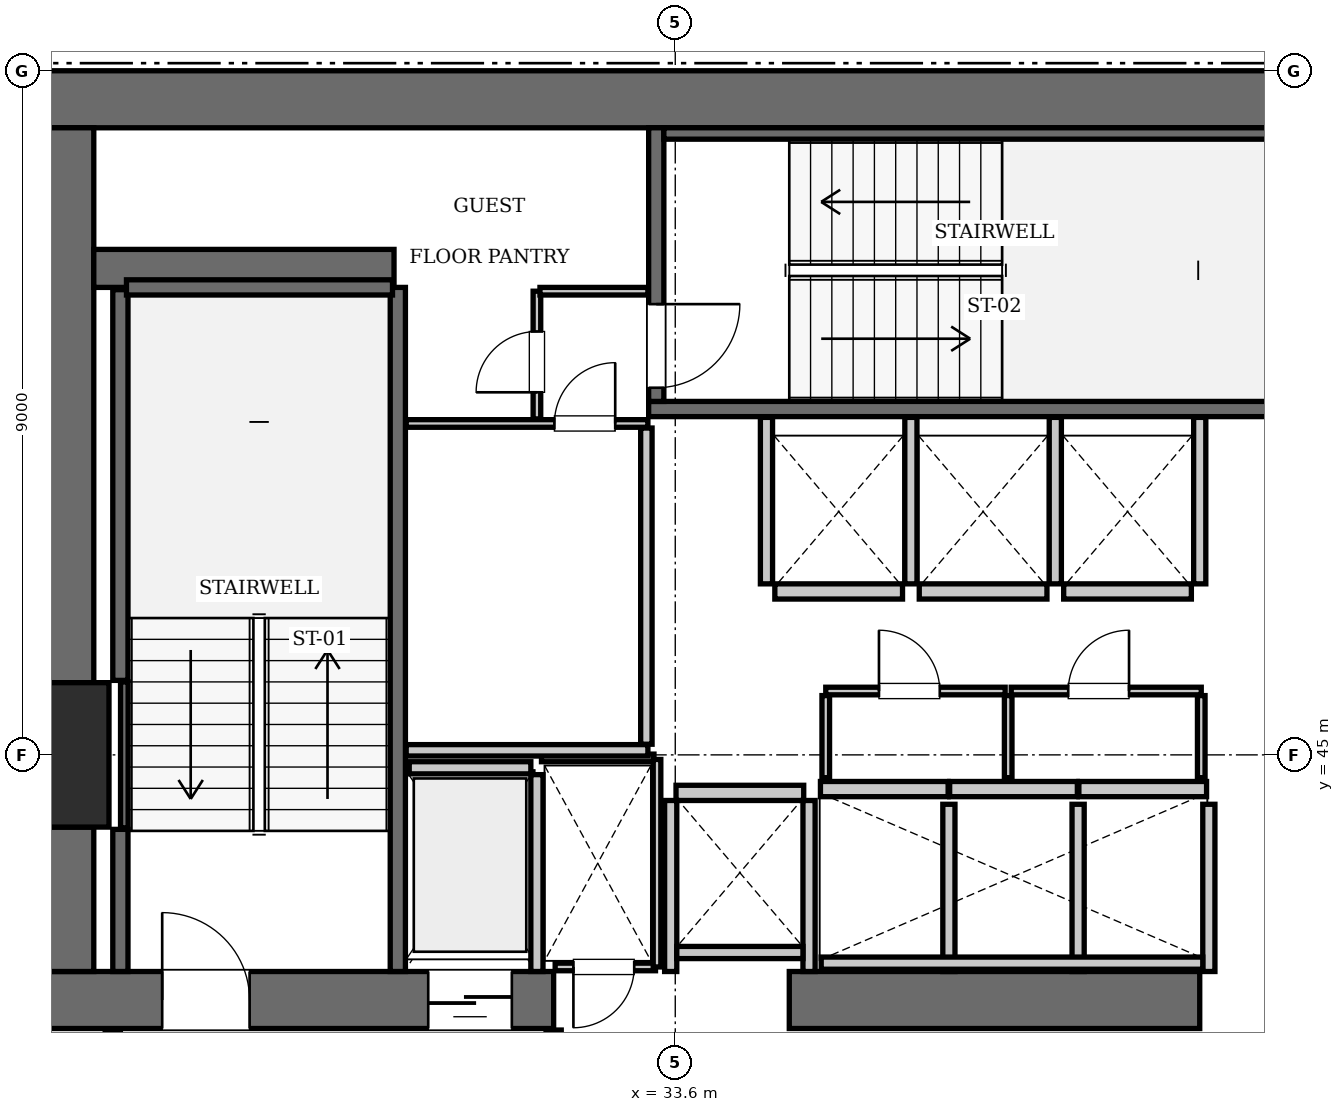
"""IFC4 building model, lengths in metres.
Left out: names, types, materials, properties, quantities, classifications, styles, units other than length and angle.
Written with IfcOpenShell. Run it as: python <this file> out.ifc"""

import sys

from ifc_helpers import new_model, si_unit, direction, frame, frame_2d, origin, origin_2d, place, context, subcontext, project, spatial, rectangle, extrude, element, fill, save


model = new_model("IFC4")
c1 = context("Model", 3, precision=1e-05, world=origin(), true_north=direction((0.0, 1.0)))
c2 = subcontext(c1, "Body", "Model", "MODEL_VIEW")
j1 = project(units=[si_unit("LENGTHUNIT", "METRE"), si_unit("PLANEANGLEUNIT", "RADIAN")], contexts=[c1])
p1 = place(None, origin())
s1 = spatial("IfcSite", under=j1, at=p1, CompositionType="ELEMENT")
p2 = place(p1, origin())
s2 = spatial("IfcBuilding", under=s1, at=p2, CompositionType="ELEMENT")
p3 = place(p2, frame((0.0, 0.0, 146.65)))
s3 = spatial("IfcBuildingStorey", under=s2, at=p3, CompositionType="ELEMENT", Elevation=146.65)
p4 = place(p3, frame((25.2, 45.0, 0.0), z_axis=(0.0, 0.0, 1.0), x_axis=(1.0, 0.0, 0.0)))
e1 = element("IfcColumn", 1, at=p4, inside=s3, PredefinedType="COLUMN", context=c2, shape_type="SweptSolid", body=[
    extrude(rectangle(XDim=1.9, YDim=1.9, at=origin_2d()), origin(), (0.0, 0.0, 1.0), 3.85),
])
p5 = place(p3, frame((25.2, 53.625, 0.0), z_axis=(0.0, 0.0, 1.0), x_axis=(1.0, 0.0, 0.0)))
e2 = element("IfcWall", 2, at=p5, inside=s3, PredefinedType="SHEAR", context=c2, shape_type="SweptSolid", body=[
    extrude(rectangle(XDim=25.2, YDim=0.75, at=frame_2d((12.6, 0.0))), origin(), (0.0, 0.0, 1.0), 3.85),
])
p6 = place(p3, frame((25.2, 41.775, 0.0), z_axis=(0.0, 0.0, 1.0), x_axis=(1.0, 0.0, 0.0)))
e3 = element("IfcWall", 3, at=p6, inside=s3, PredefinedType="SHEAR", context=c2, shape_type="SweptSolid", body=[
    extrude(rectangle(XDim=6.8, YDim=0.75, at=frame_2d((3.4, 0.0))), origin(), (0.0, 0.0, 1.0), 3.85),
])
p7 = place(p6, frame((1.65, 0.0, 0.0)))
e4 = element("IfcOpeningElement", 4, at=p7, cuts=e3, PredefinedType="OPENING", context=c2, shape_type="SweptSolid", body=[
    extrude(rectangle(XDim=1.15, YDim=2.15, at=frame_2d((0.575, 1.075))), frame((0.0, 0.385, 0.0), z_axis=(0.0, -1.0, 0.0), x_axis=(1.0, 0.0, 0.0)), (0.0, 0.0, 1.0), 0.77),
])
p8 = place(p6, frame((5.15, 0.0, 0.0)))
e5 = element("IfcOpeningElement", 5, at=p8, cuts=e3, PredefinedType="OPENING", context=c2, shape_type="SweptSolid", body=[
    extrude(rectangle(XDim=1.1, YDim=2.2, at=frame_2d((0.55, 1.1))), frame((0.0, 0.385, 0.0), z_axis=(0.0, -1.0, 0.0), x_axis=(1.0, 0.0, 0.0)), (0.0, 0.0, 1.0), 0.77),
])
p9 = place(p3, frame((35.1, 41.775, 0.0), z_axis=(0.0, 0.0, 1.0), x_axis=(1.0, 0.0, 0.0)))
e6 = element("IfcWall", 6, at=p9, inside=s3, PredefinedType="SHEAR", context=c2, shape_type="SweptSolid", body=[
    extrude(rectangle(XDim=5.4, YDim=0.75, at=frame_2d((2.7, 0.0))), origin(), (0.0, 0.0, 1.0), 3.85),
])
p10 = place(p3, frame((25.575, 42.15, 0.0), z_axis=(0.0, 0.0, 1.0), x_axis=(0.0, 1.0, 0.0)))
e7 = element("IfcWall", 7, at=p10, inside=s3, PredefinedType="SHEAR", context=c2, shape_type="SweptSolid", body=[
    extrude(rectangle(XDim=1.9, YDim=0.75, at=frame_2d((0.95, 0.0))), origin(), (0.0, 0.0, 1.0), 3.85),
])
p11 = place(p3, frame((25.575, 45.95, 0.0), z_axis=(0.0, 0.0, 1.0), x_axis=(0.0, 1.0, 0.0)))
e8 = element("IfcWall", 8, at=p11, inside=s3, PredefinedType="SHEAR", context=c2, shape_type="SweptSolid", body=[
    extrude(rectangle(XDim=7.3, YDim=0.75, at=frame_2d((3.65, 0.0))), origin(), (0.0, 0.0, 1.0), 3.85),
])
p12 = place(p3, frame((25.95, 51.4, 0.0), z_axis=(0.0, 0.0, 1.0), x_axis=(1.0, 0.0, 0.0)))
e9 = element("IfcWall", 9, at=p12, inside=s3, PredefinedType="SHEAR", context=c2, shape_type="SweptSolid", body=[
    extrude(rectangle(XDim=3.95, YDim=0.5, at=frame_2d((1.975, 0.0))), origin(), (0.0, 0.0, 1.0), 3.85),
])
p13 = place(p3, frame((29.95, 42.15, 0.0), z_axis=(0.0, 0.0, 1.0), x_axis=(0.0, 1.0, 0.0)))
e10 = element("IfcWall", 10, at=p13, inside=s3, PredefinedType="SOLIDWALL", context=c2, shape_type="SweptSolid", body=[
    extrude(rectangle(XDim=9.0, YDim=0.2, at=frame_2d((4.5, 0.0))), origin(), (0.0, 0.0, 1.0), 3.61),
])
p14 = place(p3, frame((26.3, 42.15, 0.0), z_axis=(0.0, 0.0, 1.0), x_axis=(0.0, 1.0, 0.0)))
e11 = element("IfcWall", 11, at=p14, inside=s3, PredefinedType="SOLIDWALL", context=c2, shape_type="SweptSolid", body=[
    extrude(rectangle(XDim=1.87, YDim=0.2, at=frame_2d((0.935, 0.0))), origin(), (0.0, 0.0, 1.0), 3.61),
])
p15 = place(p3, frame((26.3, 45.98, 0.0), z_axis=(0.0, 0.0, 1.0), x_axis=(0.0, 1.0, 0.0)))
e12 = element("IfcWall", 12, at=p15, inside=s3, PredefinedType="SOLIDWALL", context=c2, shape_type="SweptSolid", body=[
    extrude(rectangle(XDim=5.14, YDim=0.2, at=frame_2d((2.57, 0.0))), origin(), (0.0, 0.0, 1.0), 3.61),
])
p16 = place(p3, frame((26.38, 51.15, 0.0), z_axis=(0.0, 0.0, 1.0), x_axis=(1.0, 0.0, 0.0)))
e13 = element("IfcWall", 13, at=p16, inside=s3, PredefinedType="SOLIDWALL", context=c2, shape_type="SweptSolid", body=[
    extrude(rectangle(XDim=3.5, YDim=0.2, at=frame_2d((1.75, 0.0))), origin(), (0.0, 0.0, 1.0), 3.61),
])
p17 = place(p3, frame((26.352, 44.04, 0.0), z_axis=(0.0, 0.0, 1.0), x_axis=(0.0, 1.0, 0.0)))
e14 = element("IfcWall", 14, at=p17, inside=s3, PredefinedType="SOLIDWALL", context=c2, shape_type="SweptSolid", body=[
    extrude(rectangle(XDim=1.92, YDim=0.1, at=frame_2d((0.96, 0.0))), origin(), (0.0, 0.0, 1.0), 3.61),
])
p18 = place(p3, frame((33.25, 49.55, 0.0), z_axis=(0.0, 0.0, 1.0), x_axis=(1.0, 0.0, 0.0)))
e15 = element("IfcWall", 15, at=p18, inside=s3, PredefinedType="SOLIDWALL", context=c2, shape_type="SweptSolid", body=[
    extrude(rectangle(XDim=9.1, YDim=0.2, at=frame_2d((4.55, 0.0))), origin(), (0.0, 0.0, 1.0), 3.61),
])
p19 = place(p3, frame((33.35, 49.65, 0.0), z_axis=(0.0, 0.0, 1.0), x_axis=(0.0, 1.0, 0.0)))
e16 = element("IfcWall", 16, at=p19, inside=s3, PredefinedType="SOLIDWALL", context=c2, shape_type="SweptSolid", body=[
    extrude(rectangle(XDim=3.6, YDim=0.2, at=frame_2d((1.8, 0.0))), origin(), (0.0, 0.0, 1.0), 3.61),
])
p20 = place(p19, frame((0.18, 0.0, 0.0)))
e17 = element("IfcOpeningElement", 17, at=p20, cuts=e16, PredefinedType="OPENING", context=c2, shape_type="SweptSolid", body=[
    extrude(rectangle(XDim=1.1, YDim=2.15, at=frame_2d((0.55, 1.075))), frame((0.0, 0.11, 0.0), z_axis=(0.0, -1.0, 0.0), x_axis=(1.0, 0.0, 0.0)), (0.0, 0.0, 1.0), 0.22),
])
p21 = place(p3, frame((33.45, 53.175, 0.0), z_axis=(0.0, 0.0, 1.0), x_axis=(1.0, 0.0, 0.0)))
e18 = element("IfcWall", 18, at=p21, inside=s3, PredefinedType="SOLIDWALL", context=c2, shape_type="SweptSolid", body=[
    extrude(rectangle(XDim=8.7, YDim=0.15, at=frame_2d((4.35, 0.0))), origin(), (0.0, 0.0, 1.0), 3.61),
])
for number, where, z_axis, x_axis in (
    (19, (35.51, 44.55, 0.0), (0.0, 0.0, 1.0), (1.0, 0.0, 0.0)),
    (20, (37.21, 44.55, 0.0), (0.0, 0.0, 1.0), (1.0, 0.0, 0.0)),
):
    element("IfcWall", number, at=place(p3, frame(where, z_axis=z_axis, x_axis=x_axis)), inside=s3, PredefinedType="SOLIDWALL", context=c2, shape_type="SweptSolid", body=[
        extrude(rectangle(XDim=1.68, YDim=0.2, at=frame_2d((0.84, 0.0))), origin(), (0.0, 0.0, 1.0), 3.61),
    ])
for number, where, z_axis, x_axis in (
    (21, (38.91, 44.55, 0.0), (0.0, 0.0, 1.0), (1.0, 0.0, 0.0)),
    (22, (34.91, 47.15, 0.0), (0.0, 0.0, 1.0), (1.0, 0.0, 0.0)),
):
    element("IfcWall", number, at=place(p3, frame(where, z_axis=z_axis, x_axis=x_axis)), inside=s3, PredefinedType="SOLIDWALL", context=c2, shape_type="SweptSolid", body=[
        extrude(rectangle(XDim=1.68, YDim=0.2, at=frame_2d((0.84, 0.0))), origin(), (0.0, 0.0, 1.0), 3.61),
    ])
for number, where, z_axis, x_axis in (
    (23, (36.81, 47.15, 0.0), (0.0, 0.0, 1.0), (1.0, 0.0, 0.0)),
    (24, (38.71, 47.15, 0.0), (0.0, 0.0, 1.0), (1.0, 0.0, 0.0)),
    (25, (33.61, 44.5, 0.0), (0.0, 0.0, 1.0), (1.0, 0.0, 0.0)),
):
    element("IfcWall", number, at=place(p3, frame(where, z_axis=z_axis, x_axis=x_axis)), inside=s3, PredefinedType="SOLIDWALL", context=c2, shape_type="SweptSolid", body=[
        extrude(rectangle(XDim=1.68, YDim=0.2, at=frame_2d((0.84, 0.0))), origin(), (0.0, 0.0, 1.0), 3.61),
    ])
p22 = place(p3, frame((30.1, 44.83, 0.0), z_axis=(0.0, 0.0, 1.0), x_axis=(1.0, 0.0, 0.0)))
e26 = element("IfcWall", 26, at=p22, inside=s3, PredefinedType="SOLIDWALL", context=c2, shape_type="SweptSolid", body=[
    extrude(rectangle(XDim=1.6, YDim=0.16, at=frame_2d((0.8, 0.0))), origin(), (0.0, 0.0, 1.0), 3.61),
])
p23 = place(p3, frame((31.78, 42.15, 0.0), z_axis=(0.0, 0.0, 1.0), x_axis=(0.0, 1.0, 0.0)))
e27 = element("IfcWall", 27, at=p23, inside=s3, PredefinedType="SOLIDWALL", context=c2, shape_type="SweptSolid", body=[
    extrude(rectangle(XDim=2.59, YDim=0.16, at=frame_2d((1.295, 0.0))), origin(), (0.0, 0.0, 1.0), 3.61),
])
for number, where, z_axis, x_axis in (
    (28, (37.2, 42.15, 0.0), (0.0, 0.0, 1.0), (0.0, 1.0, 0.0)),
    (29, (38.9, 42.15, 0.0), (0.0, 0.0, 1.0), (0.0, 1.0, 0.0)),
    (30, (40.62, 42.15, 0.0), (0.0, 0.0, 1.0), (0.0, 1.0, 0.0)),
):
    element("IfcWall", number, at=place(p3, frame(where, z_axis=z_axis, x_axis=x_axis)), inside=s3, PredefinedType="SOLIDWALL", context=c2, shape_type="SweptSolid", body=[
        extrude(rectangle(XDim=2.2, YDim=0.16, at=frame_2d((1.1, 0.0))), origin(), (0.0, 0.0, 1.0), 3.61),
    ])
p24 = place(p3, frame((35.52, 42.26, 0.0), z_axis=(0.0, 0.0, 1.0), x_axis=(1.0, 0.0, 0.0)))
e31 = element("IfcWall", 31, at=p24, inside=s3, PredefinedType="SOLIDWALL", context=c2, shape_type="SweptSolid", body=[
    extrude(rectangle(XDim=5.02, YDim=0.16, at=frame_2d((2.51, 0.0))), origin(), (0.0, 0.0, 1.0), 3.61),
])
for number, where, z_axis, x_axis in (
    (32, (34.8, 47.25, 0.0), (0.0, 0.0, 1.0), (0.0, 1.0, 0.0)),
    (33, (36.7, 47.25, 0.0), (0.0, 0.0, 1.0), (0.0, 1.0, 0.0)),
    (34, (38.6, 47.25, 0.0), (0.0, 0.0, 1.0), (0.0, 1.0, 0.0)),
    (35, (40.5, 47.25, 0.0), (0.0, 0.0, 1.0), (0.0, 1.0, 0.0)),
):
    element("IfcWall", number, at=place(p3, frame(where, z_axis=z_axis, x_axis=x_axis)), inside=s3, PredefinedType="SOLIDWALL", context=c2, shape_type="SweptSolid", body=[
        extrude(rectangle(XDim=2.19, YDim=0.16, at=frame_2d((1.095, 0.0))), origin(), (0.0, 0.0, 1.0), 3.61),
    ])
for number, where, z_axis, x_axis in (
    (36, (33.54, 42.15, 0.0), (0.0, 0.0, 1.0), (0.0, 1.0, 0.0)),
    (37, (35.36, 42.15, 0.0), (0.0, 0.0, 1.0), (0.0, 1.0, 0.0)),
):
    element("IfcWall", number, at=place(p3, frame(where, z_axis=z_axis, x_axis=x_axis)), inside=s3, PredefinedType="SOLIDWALL", context=c2, shape_type="SweptSolid", body=[
        extrude(rectangle(XDim=2.25, YDim=0.16, at=frame_2d((1.125, 0.0))), origin(), (0.0, 0.0, 1.0), 3.61),
    ])
p25 = place(p3, frame((33.62, 42.4, 0.0), z_axis=(0.0, 0.0, 1.0), x_axis=(1.0, 0.0, 0.0)))
e38 = element("IfcWall", 38, at=p25, inside=s3, PredefinedType="SOLIDWALL", context=c2, shape_type="SweptSolid", body=[
    extrude(rectangle(XDim=1.66, YDim=0.16, at=frame_2d((0.83, 0.0))), origin(), (0.0, 0.0, 1.0), 3.61),
])
for number, where, z_axis, x_axis in (
    (39, (26.2, 38.31, 0.0), (0.0, 0.0, 1.0), (0.0, 1.0, 0.0)),
    (40, (32.0, 38.31, 0.0), (0.0, 0.0, 1.0), (0.0, 1.0, 0.0)),
):
    element("IfcWall", number, at=place(p3, frame(where, z_axis=z_axis, x_axis=x_axis)), inside=s3, PredefinedType="PARTITIONING", context=c2, shape_type="SweptSolid", body=[
        extrude(rectangle(XDim=3.07, YDim=0.2, at=frame_2d((1.535, 0.0))), origin(), (0.0, 0.0, 1.0), 3.61),
    ])
p26 = place(p3, frame((32.02, 42.21, 0.0), z_axis=(0.0, 0.0, 1.0), x_axis=(1.0, 0.0, 0.0)))
e41 = element("IfcWall", 41, at=p26, inside=s3, PredefinedType="PARTITIONING", context=c2, shape_type="SweptSolid", body=[
    extrude(rectangle(XDim=1.32, YDim=0.1, at=frame_2d((0.66, 0.0))), origin(), (0.0, 0.0, 1.0), 3.61),
])
p27 = place(p26, frame((0.24, 0.0, 0.0)))
e42 = element("IfcOpeningElement", 42, at=p27, cuts=e41, PredefinedType="OPENING", context=c2, shape_type="SweptSolid", body=[
    extrude(rectangle(XDim=0.8, YDim=2.05, at=frame_2d((0.4, 1.025))), frame((0.0, 0.06, 0.0), z_axis=(0.0, -1.0, 0.0), x_axis=(1.0, 0.0, 0.0)), (0.0, 0.0, 1.0), 0.12),
])
p28 = place(p3, frame((31.84, 44.96, 0.0), z_axis=(0.0, 0.0, 1.0), x_axis=(1.0, 0.0, 0.0)))
e43 = element("IfcWall", 43, at=p28, inside=s3, PredefinedType="PARTITIONING", context=c2, shape_type="SweptSolid", body=[
    extrude(rectangle(XDim=1.48, YDim=0.1, at=frame_2d((0.74, 0.0))), origin(), (0.0, 0.0, 1.0), 3.61),
])
p29 = place(p3, frame((33.36, 42.21, 0.0), z_axis=(0.0, 0.0, 1.0), x_axis=(0.0, 1.0, 0.0)))
e44 = element("IfcWall", 44, at=p29, inside=s3, PredefinedType="PARTITIONING", context=c2, shape_type="SweptSolid", body=[
    extrude(rectangle(XDim=2.73, YDim=0.1, at=frame_2d((1.365, 0.0))), origin(), (0.0, 0.0, 1.0), 3.61),
])
p30 = place(p3, frame((35.58, 45.84, 0.0), z_axis=(0.0, 0.0, 1.0), x_axis=(1.0, 0.0, 0.0)))
e45 = element("IfcWall", 45, at=p30, inside=s3, PredefinedType="PARTITIONING", context=c2, shape_type="SweptSolid", body=[
    extrude(rectangle(XDim=2.36, YDim=0.1, at=frame_2d((1.18, 0.0))), origin(), (0.0, 0.0, 1.0), 3.61),
])
p31 = place(p30, frame((0.7, 0.0, 0.0)))
e46 = element("IfcOpeningElement", 46, at=p31, cuts=e45, PredefinedType="OPENING", context=c2, shape_type="SweptSolid", body=[
    extrude(rectangle(XDim=0.8, YDim=2.05, at=frame_2d((0.4, 1.025))), frame((0.0, 0.06, 0.0), z_axis=(0.0, -1.0, 0.0), x_axis=(1.0, 0.0, 0.0)), (0.0, 0.0, 1.0), 0.12),
])
p32 = place(p3, frame((38.02, 45.84, 0.0), z_axis=(0.0, 0.0, 1.0), x_axis=(1.0, 0.0, 0.0)))
e47 = element("IfcWall", 47, at=p32, inside=s3, PredefinedType="PARTITIONING", context=c2, shape_type="SweptSolid", body=[
    extrude(rectangle(XDim=2.5, YDim=0.1, at=frame_2d((1.25, 0.0))), origin(), (0.0, 0.0, 1.0), 3.61),
])
p33 = place(p32, frame((0.75, 0.0, 0.0)))
e48 = element("IfcOpeningElement", 48, at=p33, cuts=e47, PredefinedType="OPENING", context=c2, shape_type="SweptSolid", body=[
    extrude(rectangle(XDim=0.8, YDim=2.05, at=frame_2d((0.4, 1.025))), frame((0.0, 0.06, 0.0), z_axis=(0.0, -1.0, 0.0), x_axis=(1.0, 0.0, 0.0)), (0.0, 0.0, 1.0), 0.12),
])
for number, where, z_axis, x_axis in (
    (49, (35.58, 44.7, 0.0), (0.0, 0.0, 1.0), (0.0, 1.0, 0.0)),
    (50, (37.98, 44.7, 0.0), (0.0, 0.0, 1.0), (0.0, 1.0, 0.0)),
    (51, (40.52, 44.7, 0.0), (0.0, 0.0, 1.0), (0.0, 1.0, 0.0)),
):
    element("IfcWall", number, at=place(p3, frame(where, z_axis=z_axis, x_axis=x_axis)), inside=s3, PredefinedType="PARTITIONING", context=c2, shape_type="SweptSolid", body=[
        extrude(rectangle(XDim=1.08, YDim=0.1, at=frame_2d((0.54, 0.0))), origin(), (0.0, 0.0, 1.0), 3.61),
    ])
p34 = place(p3, frame((30.06, 45.06, 0.0), z_axis=(0.0, 0.0, 1.0), x_axis=(1.0, 0.0, 0.0)))
e52 = element("IfcWall", 52, at=p34, inside=s3, PredefinedType="PARTITIONING", context=c2, shape_type="SweptSolid", body=[
    extrude(rectangle(XDim=3.18, YDim=0.15, at=frame_2d((1.59, 0.0))), origin(), (0.0, 0.0, 1.0), 3.61),
])
p35 = place(p3, frame((33.22, 45.14, 0.0), z_axis=(0.0, 0.0, 1.0), x_axis=(0.0, 1.0, 0.0)))
e53 = element("IfcWall", 53, at=p35, inside=s3, PredefinedType="PARTITIONING", context=c2, shape_type="SweptSolid", body=[
    extrude(rectangle(XDim=4.16, YDim=0.15, at=frame_2d((2.08, 0.0))), origin(), (0.0, 0.0, 1.0), 3.61),
])
p36 = place(p3, frame((30.06, 49.36, 0.0), z_axis=(0.0, 0.0, 1.0), x_axis=(1.0, 0.0, 0.0)))
e54 = element("IfcWall", 54, at=p36, inside=s3, PredefinedType="PARTITIONING", context=c2, shape_type="SweptSolid", body=[
    extrude(rectangle(XDim=3.18, YDim=0.1, at=frame_2d((1.59, 0.0))), origin(), (0.0, 0.0, 1.0), 3.61),
])
p37 = place(p36, frame((1.95, 0.0, 0.0)))
e55 = element("IfcOpeningElement", 55, at=p37, cuts=e54, PredefinedType="OPENING", context=c2, shape_type="SweptSolid", body=[
    extrude(rectangle(XDim=0.8, YDim=2.05, at=frame_2d((0.4, 1.025))), frame((0.0, 0.06, 0.0), z_axis=(0.0, -1.0, 0.0), x_axis=(1.0, 0.0, 0.0)), (0.0, 0.0, 1.0), 0.12),
])
p38 = place(p3, frame((31.78, 49.42, 0.0), z_axis=(0.0, 0.0, 1.0), x_axis=(0.0, 1.0, 0.0)))
e56 = element("IfcWall", 56, at=p38, inside=s3, PredefinedType="PARTITIONING", context=c2, shape_type="SweptSolid", body=[
    extrude(rectangle(XDim=1.68, YDim=0.1, at=frame_2d((0.84, 0.0))), origin(), (0.0, 0.0, 1.0), 3.61),
])
p39 = place(p38, frame((0.35, 0.0, 0.0)))
e57 = element("IfcOpeningElement", 57, at=p39, cuts=e56, PredefinedType="OPENING", context=c2, shape_type="SweptSolid", body=[
    extrude(rectangle(XDim=0.8, YDim=2.05, at=frame_2d((0.4, 1.025))), frame((0.0, 0.06, 0.0), z_axis=(0.0, -1.0, 0.0), x_axis=(1.0, 0.0, 0.0)), (0.0, 0.0, 1.0), 0.12),
])
p40 = place(p3, frame((31.82, 51.1, 0.0), z_axis=(0.0, 0.0, 1.0), x_axis=(1.0, 0.0, 0.0)))
e58 = element("IfcWall", 58, at=p40, inside=s3, PredefinedType="PARTITIONING", context=c2, shape_type="SweptSolid", body=[
    extrude(rectangle(XDim=1.42, YDim=0.1, at=frame_2d((0.71, 0.0))), origin(), (0.0, 0.0, 1.0), 3.61),
])
p41 = place(p7, origin())
e59 = element("IfcDoor", 59, at=p41, inside=s3, OperationType="SINGLE_SWING_LEFT", PredefinedType="DOOR", context=c2, shape_type="SweptSolid", body=[
    extrude(rectangle(XDim=1.15, YDim=2.15, at=frame_2d((0.575, 1.075))), frame((0.0, 0.025, 0.0), z_axis=(0.0, -1.0, 0.0), x_axis=(1.0, 0.0, 0.0)), (0.0, 0.0, 1.0), 0.05),
])
fill(e4, e59)
p42 = place(p20, frame((1.1, 0.0, 0.0), z_axis=(0.0, 0.0, 1.0), x_axis=(-1.0, 0.0, 0.0)))
e60 = element("IfcDoor", 60, at=p42, inside=s3, OperationType="SINGLE_SWING_LEFT", PredefinedType="DOOR", context=c2, shape_type="SweptSolid", body=[
    extrude(rectangle(XDim=1.1, YDim=2.15, at=frame_2d((0.55, 1.075))), frame((0.0, 0.025, 0.0), z_axis=(0.0, -1.0, 0.0), x_axis=(1.0, 0.0, 0.0)), (0.0, 0.0, 1.0), 0.05),
])
fill(e17, e60)
p43 = place(p8, frame((1.1, 0.0, 0.0), z_axis=(0.0, 0.0, 1.0), x_axis=(-1.0, 0.0, 0.0)))
e61 = element("IfcDoor", 61, at=p43, inside=s3, OperationType="SLIDING_TO_LEFT", PredefinedType="DOOR", context=c2, shape_type="SweptSolid", body=[
    extrude(rectangle(XDim=1.1, YDim=2.2, at=frame_2d((0.55, 1.1))), frame((0.0, 0.025, 0.0), z_axis=(0.0, -1.0, 0.0), x_axis=(1.0, 0.0, 0.0)), (0.0, 0.0, 1.0), 0.05),
])
fill(e5, e61)
p44 = place(p27, frame((0.8, 0.0, 0.0), z_axis=(0.0, 0.0, 1.0), x_axis=(-1.0, 0.0, 0.0)))
e62 = element("IfcDoor", 62, at=p44, inside=s3, OperationType="SINGLE_SWING_RIGHT", PredefinedType="DOOR", context=c2, shape_type="SweptSolid", body=[
    extrude(rectangle(XDim=0.8, YDim=2.05, at=frame_2d((0.4, 1.025))), frame((0.0, 0.025, 0.0), z_axis=(0.0, -1.0, 0.0), x_axis=(1.0, 0.0, 0.0)), (0.0, 0.0, 1.0), 0.05),
])
fill(e42, e62)
p45 = place(p31, origin())
e63 = element("IfcDoor", 63, at=p45, inside=s3, OperationType="SINGLE_SWING_LEFT", PredefinedType="DOOR", context=c2, shape_type="SweptSolid", body=[
    extrude(rectangle(XDim=0.8, YDim=2.05, at=frame_2d((0.4, 1.025))), frame((0.0, 0.025, 0.0), z_axis=(0.0, -1.0, 0.0), x_axis=(1.0, 0.0, 0.0)), (0.0, 0.0, 1.0), 0.05),
])
fill(e46, e63)
p46 = place(p33, origin())
e64 = element("IfcDoor", 64, at=p46, inside=s3, OperationType="SINGLE_SWING_RIGHT", PredefinedType="DOOR", context=c2, shape_type="SweptSolid", body=[
    extrude(rectangle(XDim=0.8, YDim=2.05, at=frame_2d((0.4, 1.025))), frame((0.0, 0.025, 0.0), z_axis=(0.0, -1.0, 0.0), x_axis=(1.0, 0.0, 0.0)), (0.0, 0.0, 1.0), 0.05),
])
fill(e48, e64)
p47 = place(p37, origin())
e65 = element("IfcDoor", 65, at=p47, inside=s3, OperationType="SINGLE_SWING_RIGHT", PredefinedType="DOOR", context=c2, shape_type="SweptSolid", body=[
    extrude(rectangle(XDim=0.8, YDim=2.05, at=frame_2d((0.4, 1.025))), frame((0.0, 0.025, 0.0), z_axis=(0.0, -1.0, 0.0), x_axis=(1.0, 0.0, 0.0)), (0.0, 0.0, 1.0), 0.05),
])
fill(e55, e65)
p48 = place(p39, origin())
e66 = element("IfcDoor", 66, at=p48, inside=s3, OperationType="SINGLE_SWING_LEFT", PredefinedType="DOOR", context=c2, shape_type="SweptSolid", body=[
    extrude(rectangle(XDim=0.8, YDim=2.05, at=frame_2d((0.4, 1.025))), frame((0.0, 0.025, 0.0), z_axis=(0.0, -1.0, 0.0), x_axis=(1.0, 0.0, 0.0)), (0.0, 0.0, 1.0), 0.05),
])
fill(e57, e66)
save(model, sys.argv[1])
